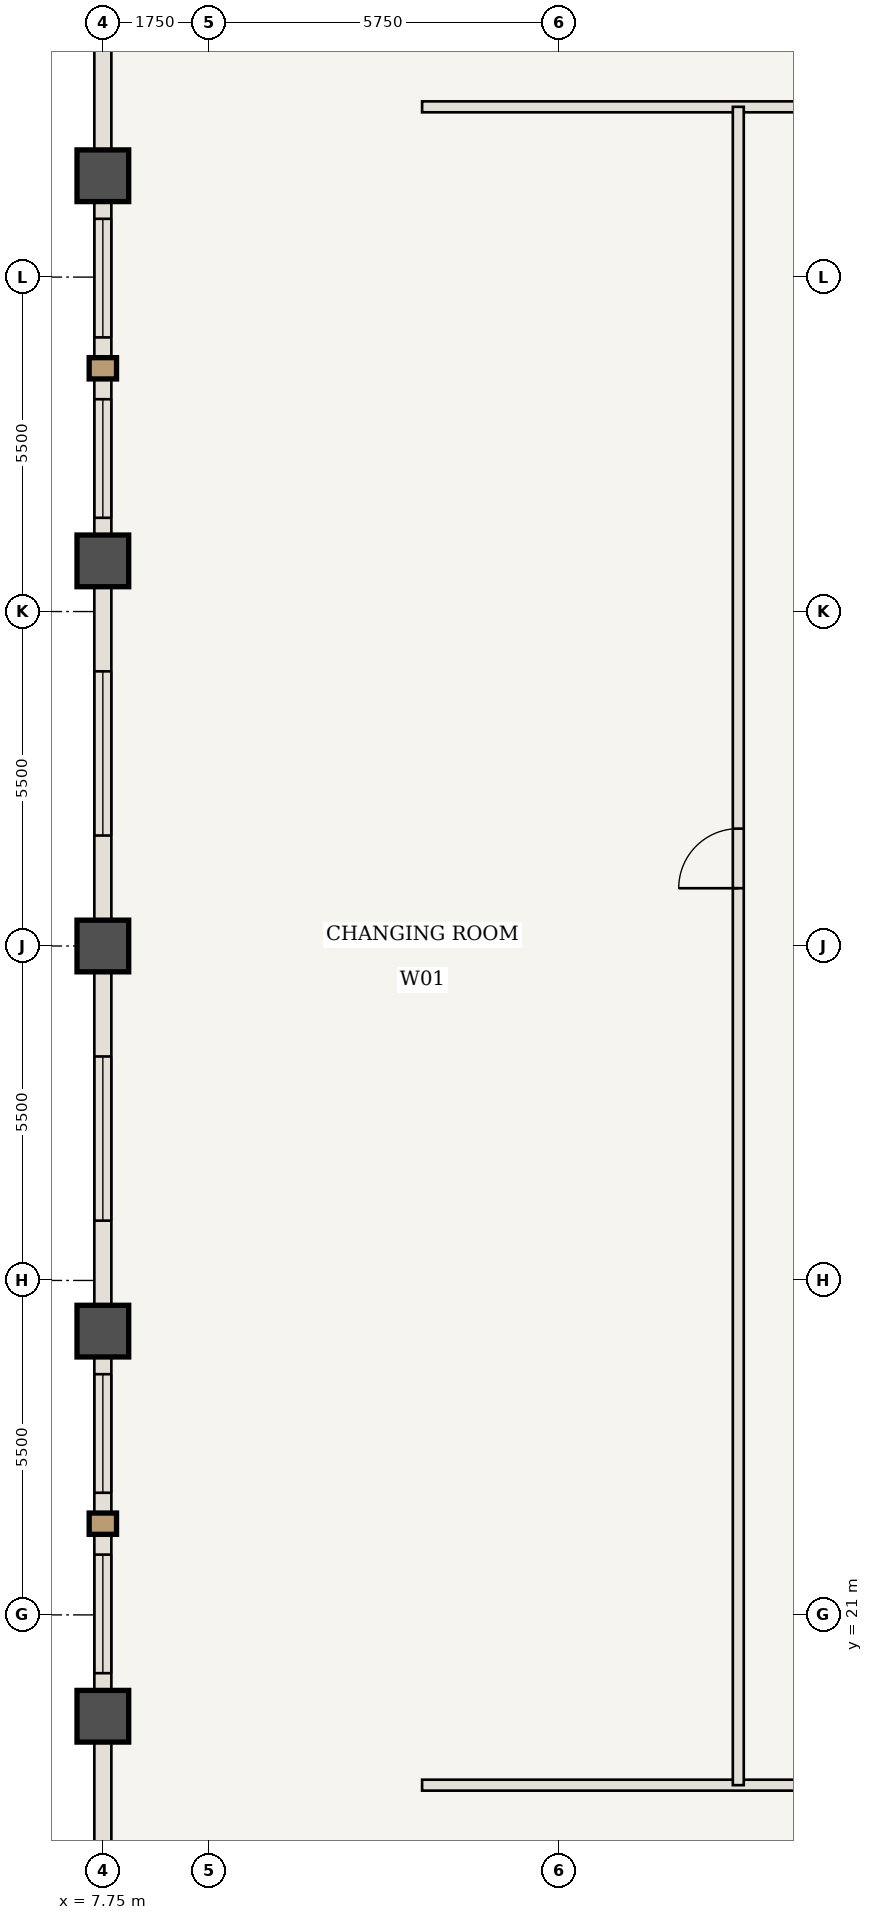
"""IFC4 building model, lengths in metres.
Left out: names, types, materials, properties, quantities, classifications, styles, units other than length and angle.
Written with IfcOpenShell. Run it as: python <this file> out.ifc"""

import sys

from ifc_helpers import new_model, si_unit, direction, frame, frame_2d, origin, origin_2d, place, context, subcontext, project, spatial, rectangle, extrude, element, fill, save


model = new_model("IFC4")
c1 = context("Model", 3, precision=1e-05, world=origin(), true_north=direction((0.0, 1.0)))
c2 = subcontext(c1, "Body", "Model", "MODEL_VIEW")
j1 = project(units=[si_unit("LENGTHUNIT", "METRE"), si_unit("PLANEANGLEUNIT", "RADIAN")], contexts=[c1])
p1 = place(None, origin())
s1 = spatial("IfcSite", under=j1, at=p1, CompositionType="ELEMENT")
p2 = place(p1, origin())
s2 = spatial("IfcBuilding", under=s1, at=p2, CompositionType="ELEMENT")
p3 = place(p2, frame((0.0, 0.0, 248.5)))
s3 = spatial("IfcBuildingStorey", under=s2, at=p3, CompositionType="ELEMENT", Elevation=248.5)
for number, where, z_axis, x_axis in (
    (1, (7.75, 19.333, 0.0), (0.0, 0.0, 1.0), (1.0, 0.0, 0.0)),
    (2, (7.75, 25.667, 0.0), (0.0, 0.0, 1.0), (1.0, 0.0, 0.0)),
    (3, (7.75, 32.0, 0.0), (0.0, 0.0, 1.0), (1.0, 0.0, 0.0)),
    (4, (7.75, 38.333, 0.0), (0.0, 0.0, 1.0), (1.0, 0.0, 0.0)),
    (5, (7.75, 44.667, 0.0), (0.0, 0.0, 1.0), (1.0, 0.0, 0.0)),
):
    element("IfcColumn", number, at=place(p3, frame(where, z_axis=z_axis, x_axis=x_axis)), inside=s3, PredefinedType="COLUMN", context=c2, shape_type="SweptSolid", body=[
        extrude(rectangle(XDim=0.85, YDim=0.85, at=origin_2d()), origin(), (0.0, 0.0, 1.0), 3.85),
    ])
p4 = place(p3, frame((13.0, 18.2, 0.0), z_axis=(0.0, 0.0, 1.0), x_axis=(1.0, 0.0, 0.0)))
e6 = element("IfcWall", 6, at=p4, inside=s3, PredefinedType="STANDARD", context=c2, shape_type="SweptSolid", body=[
    extrude(rectangle(XDim=38.0, YDim=0.18, at=frame_2d((19.0, 0.0))), origin(), (0.0, 0.0, 1.0), 3.43),
])
p5 = place(p4, frame((19.825, 0.0, 0.0)))
e7 = element("IfcOpeningElement", 7, at=p5, cuts=e6, PredefinedType="OPENING", context=c2, shape_type="SweptSolid", body=[
    extrude(rectangle(XDim=0.98, YDim=2.2, at=frame_2d((0.49, 1.1))), frame((0.0, 0.1, 0.0), z_axis=(0.0, -1.0, 0.0), x_axis=(1.0, 0.0, 0.0)), (0.0, 0.0, 1.0), 0.2),
])
p6 = place(p3, frame((13.0, 45.8, 0.0), z_axis=(0.0, 0.0, 1.0), x_axis=(1.0, 0.0, 0.0)))
e8 = element("IfcWall", 8, at=p6, inside=s3, PredefinedType="STANDARD", context=c2, shape_type="SweptSolid", body=[
    extrude(rectangle(XDim=13.592, YDim=0.18, at=frame_2d((6.796, 0.0))), origin(), (0.0, 0.0, 1.0), 3.43),
])
p7 = place(p6, frame((8.896, 0.0, 0.0)))
e9 = element("IfcOpeningElement", 9, at=p7, cuts=e8, PredefinedType="OPENING", context=c2, shape_type="SweptSolid", body=[
    extrude(rectangle(XDim=0.98, YDim=2.2, at=frame_2d((0.49, 1.1))), frame((0.0, 0.1, 0.0), z_axis=(0.0, -1.0, 0.0), x_axis=(1.0, 0.0, 0.0)), (0.0, 0.0, 1.0), 0.2),
])
p8 = place(p3, frame((18.2, 18.2, 0.0), z_axis=(0.0, 0.0, 1.0), x_axis=(0.0, 1.0, 0.0)))
e10 = element("IfcWall", 10, at=p8, inside=s3, PredefinedType="STANDARD", context=c2, shape_type="SweptSolid", body=[
    extrude(rectangle(XDim=27.6, YDim=0.18, at=frame_2d((13.8, 0.0))), origin(), (0.0, 0.0, 1.0), 3.43),
])
p9 = place(p8, frame((14.75, 0.0, 0.0)))
e11 = element("IfcOpeningElement", 11, at=p9, cuts=e10, PredefinedType="OPENING", context=c2, shape_type="SweptSolid", body=[
    extrude(rectangle(XDim=0.98, YDim=2.2, at=frame_2d((0.49, 1.1))), frame((0.0, 0.1, 0.0), z_axis=(0.0, -1.0, 0.0), x_axis=(1.0, 0.0, 0.0)), (0.0, 0.0, 1.0), 0.2),
])
p10 = place(p3, frame((7.75, 13.0, 0.0), z_axis=(0.0, 0.0, 1.0), x_axis=(0.0, 1.0, 0.0)))
e12 = element("IfcWall", 12, at=p10, inside=s3, PredefinedType="USERDEFINED", context=c2, shape_type="SweptSolid", body=[
    extrude(rectangle(XDim=6.333, YDim=0.28, at=frame_2d((3.167, 0.0))), origin(), (0.0, 0.0, 1.0), 2.73),
])
p11 = place(p3, frame((7.75, 19.333, 0.0), z_axis=(0.0, 0.0, 1.0), x_axis=(0.0, 1.0, 0.0)))
e13 = element("IfcWall", 13, at=p11, inside=s3, PredefinedType="USERDEFINED", context=c2, shape_type="SweptSolid", body=[
    extrude(rectangle(XDim=6.333, YDim=0.28, at=frame_2d((3.167, 0.0))), origin(), (0.0, 0.0, 1.0), 2.73),
])
p12 = place(p11, frame((0.708, 0.0, 0.85)))
e14 = element("IfcOpeningElement", 14, at=p12, cuts=e13, PredefinedType="OPENING", context=c2, shape_type="SweptSolid", body=[
    extrude(rectangle(XDim=1.95, YDim=1.68, at=frame_2d((0.975, 0.84))), frame((0.0, 0.15, 0.0), z_axis=(0.0, -1.0, 0.0), x_axis=(1.0, 0.0, 0.0)), (0.0, 0.0, 1.0), 0.3),
])
p13 = place(p11, frame((3.675, 0.0, 0.85)))
e15 = element("IfcOpeningElement", 15, at=p13, cuts=e13, PredefinedType="OPENING", context=c2, shape_type="SweptSolid", body=[
    extrude(rectangle(XDim=1.95, YDim=1.68, at=frame_2d((0.975, 0.84))), frame((0.0, 0.15, 0.0), z_axis=(0.0, -1.0, 0.0), x_axis=(1.0, 0.0, 0.0)), (0.0, 0.0, 1.0), 0.3),
])
p14 = place(p3, frame((7.75, 25.667, 0.0), z_axis=(0.0, 0.0, 1.0), x_axis=(0.0, 1.0, 0.0)))
e16 = element("IfcWall", 16, at=p14, inside=s3, PredefinedType="USERDEFINED", context=c2, shape_type="SweptSolid", body=[
    extrude(rectangle(XDim=6.333, YDim=0.28, at=frame_2d((3.167, 0.0))), origin(), (0.0, 0.0, 1.0), 2.73),
])
p15 = place(p14, frame((1.817, 0.0, 0.85)))
e17 = element("IfcOpeningElement", 17, at=p15, cuts=e16, PredefinedType="OPENING", context=c2, shape_type="SweptSolid", body=[
    extrude(rectangle(XDim=2.7, YDim=1.68, at=frame_2d((1.35, 0.84))), frame((0.0, 0.15, 0.0), z_axis=(0.0, -1.0, 0.0), x_axis=(1.0, 0.0, 0.0)), (0.0, 0.0, 1.0), 0.3),
])
p16 = place(p3, frame((7.75, 32.0, 0.0), z_axis=(0.0, 0.0, 1.0), x_axis=(0.0, 1.0, 0.0)))
e18 = element("IfcWall", 18, at=p16, inside=s3, PredefinedType="USERDEFINED", context=c2, shape_type="SweptSolid", body=[
    extrude(rectangle(XDim=6.333, YDim=0.28, at=frame_2d((3.167, 0.0))), origin(), (0.0, 0.0, 1.0), 2.73),
])
p17 = place(p16, frame((1.817, 0.0, 0.85)))
e19 = element("IfcOpeningElement", 19, at=p17, cuts=e18, PredefinedType="OPENING", context=c2, shape_type="SweptSolid", body=[
    extrude(rectangle(XDim=2.7, YDim=1.68, at=frame_2d((1.35, 0.84))), frame((0.0, 0.15, 0.0), z_axis=(0.0, -1.0, 0.0), x_axis=(1.0, 0.0, 0.0)), (0.0, 0.0, 1.0), 0.3),
])
p18 = place(p3, frame((7.75, 38.333, 0.0), z_axis=(0.0, 0.0, 1.0), x_axis=(0.0, 1.0, 0.0)))
e20 = element("IfcWall", 20, at=p18, inside=s3, PredefinedType="USERDEFINED", context=c2, shape_type="SweptSolid", body=[
    extrude(rectangle(XDim=6.333, YDim=0.28, at=frame_2d((3.167, 0.0))), origin(), (0.0, 0.0, 1.0), 2.73),
])
p19 = place(p18, frame((0.708, 0.0, 0.85)))
e21 = element("IfcOpeningElement", 21, at=p19, cuts=e20, PredefinedType="OPENING", context=c2, shape_type="SweptSolid", body=[
    extrude(rectangle(XDim=1.95, YDim=1.68, at=frame_2d((0.975, 0.84))), frame((0.0, 0.15, 0.0), z_axis=(0.0, -1.0, 0.0), x_axis=(1.0, 0.0, 0.0)), (0.0, 0.0, 1.0), 0.3),
])
p20 = place(p18, frame((3.675, 0.0, 0.85)))
e22 = element("IfcOpeningElement", 22, at=p20, cuts=e20, PredefinedType="OPENING", context=c2, shape_type="SweptSolid", body=[
    extrude(rectangle(XDim=1.95, YDim=1.68, at=frame_2d((0.975, 0.84))), frame((0.0, 0.15, 0.0), z_axis=(0.0, -1.0, 0.0), x_axis=(1.0, 0.0, 0.0)), (0.0, 0.0, 1.0), 0.3),
])
p21 = place(p3, frame((7.75, 44.667, 0.0), z_axis=(0.0, 0.0, 1.0), x_axis=(0.0, 1.0, 0.0)))
e23 = element("IfcWall", 23, at=p21, inside=s3, PredefinedType="USERDEFINED", context=c2, shape_type="SweptSolid", body=[
    extrude(rectangle(XDim=6.333, YDim=0.28, at=frame_2d((3.167, 0.0))), origin(), (0.0, 0.0, 1.0), 2.73),
])
p22 = place(p9, origin())
e24 = element("IfcDoor", 24, at=p22, inside=s3, OperationType="SINGLE_SWING_LEFT", PredefinedType="DOOR", context=c2, shape_type="SweptSolid", body=[
    extrude(rectangle(XDim=0.98, YDim=2.2, at=frame_2d((0.49, 1.1))), frame((0.0, 0.025, 0.0), z_axis=(0.0, -1.0, 0.0), x_axis=(1.0, 0.0, 0.0)), (0.0, 0.0, 1.0), 0.05),
])
fill(e11, e24)
p23 = place(p12, origin())
e25 = element("IfcWindow", 25, at=p23, inside=s3, PartitioningType="SINGLE_PANEL", PredefinedType="WINDOW", context=c2, shape_type="SweptSolid", body=[
    extrude(rectangle(XDim=1.95, YDim=1.68, at=frame_2d((0.975, 0.84))), frame((0.0, 0.03, 0.0), z_axis=(0.0, -1.0, 0.0), x_axis=(1.0, 0.0, 0.0)), (0.0, 0.0, 1.0), 0.06),
])
fill(e14, e25)
p24 = place(p13, origin())
e26 = element("IfcWindow", 26, at=p24, inside=s3, PartitioningType="SINGLE_PANEL", PredefinedType="WINDOW", context=c2, shape_type="SweptSolid", body=[
    extrude(rectangle(XDim=1.95, YDim=1.68, at=frame_2d((0.975, 0.84))), frame((0.0, 0.03, 0.0), z_axis=(0.0, -1.0, 0.0), x_axis=(1.0, 0.0, 0.0)), (0.0, 0.0, 1.0), 0.06),
])
fill(e15, e26)
p25 = place(p15, origin())
e27 = element("IfcWindow", 27, at=p25, inside=s3, PartitioningType="SINGLE_PANEL", PredefinedType="WINDOW", context=c2, shape_type="SweptSolid", body=[
    extrude(rectangle(XDim=2.7, YDim=1.68, at=frame_2d((1.35, 0.84))), frame((0.0, 0.03, 0.0), z_axis=(0.0, -1.0, 0.0), x_axis=(1.0, 0.0, 0.0)), (0.0, 0.0, 1.0), 0.06),
])
fill(e17, e27)
p26 = place(p17, origin())
e28 = element("IfcWindow", 28, at=p26, inside=s3, PartitioningType="SINGLE_PANEL", PredefinedType="WINDOW", context=c2, shape_type="SweptSolid", body=[
    extrude(rectangle(XDim=2.7, YDim=1.68, at=frame_2d((1.35, 0.84))), frame((0.0, 0.03, 0.0), z_axis=(0.0, -1.0, 0.0), x_axis=(1.0, 0.0, 0.0)), (0.0, 0.0, 1.0), 0.06),
])
fill(e19, e28)
p27 = place(p19, origin())
e29 = element("IfcWindow", 29, at=p27, inside=s3, PartitioningType="SINGLE_PANEL", PredefinedType="WINDOW", context=c2, shape_type="SweptSolid", body=[
    extrude(rectangle(XDim=1.95, YDim=1.68, at=frame_2d((0.975, 0.84))), frame((0.0, 0.03, 0.0), z_axis=(0.0, -1.0, 0.0), x_axis=(1.0, 0.0, 0.0)), (0.0, 0.0, 1.0), 0.06),
])
fill(e21, e29)
p28 = place(p20, origin())
e30 = element("IfcWindow", 30, at=p28, inside=s3, PartitioningType="SINGLE_PANEL", PredefinedType="WINDOW", context=c2, shape_type="SweptSolid", body=[
    extrude(rectangle(XDim=1.95, YDim=1.68, at=frame_2d((0.975, 0.84))), frame((0.0, 0.03, 0.0), z_axis=(0.0, -1.0, 0.0), x_axis=(1.0, 0.0, 0.0)), (0.0, 0.0, 1.0), 0.06),
])
fill(e22, e30)
save(model, sys.argv[1])
